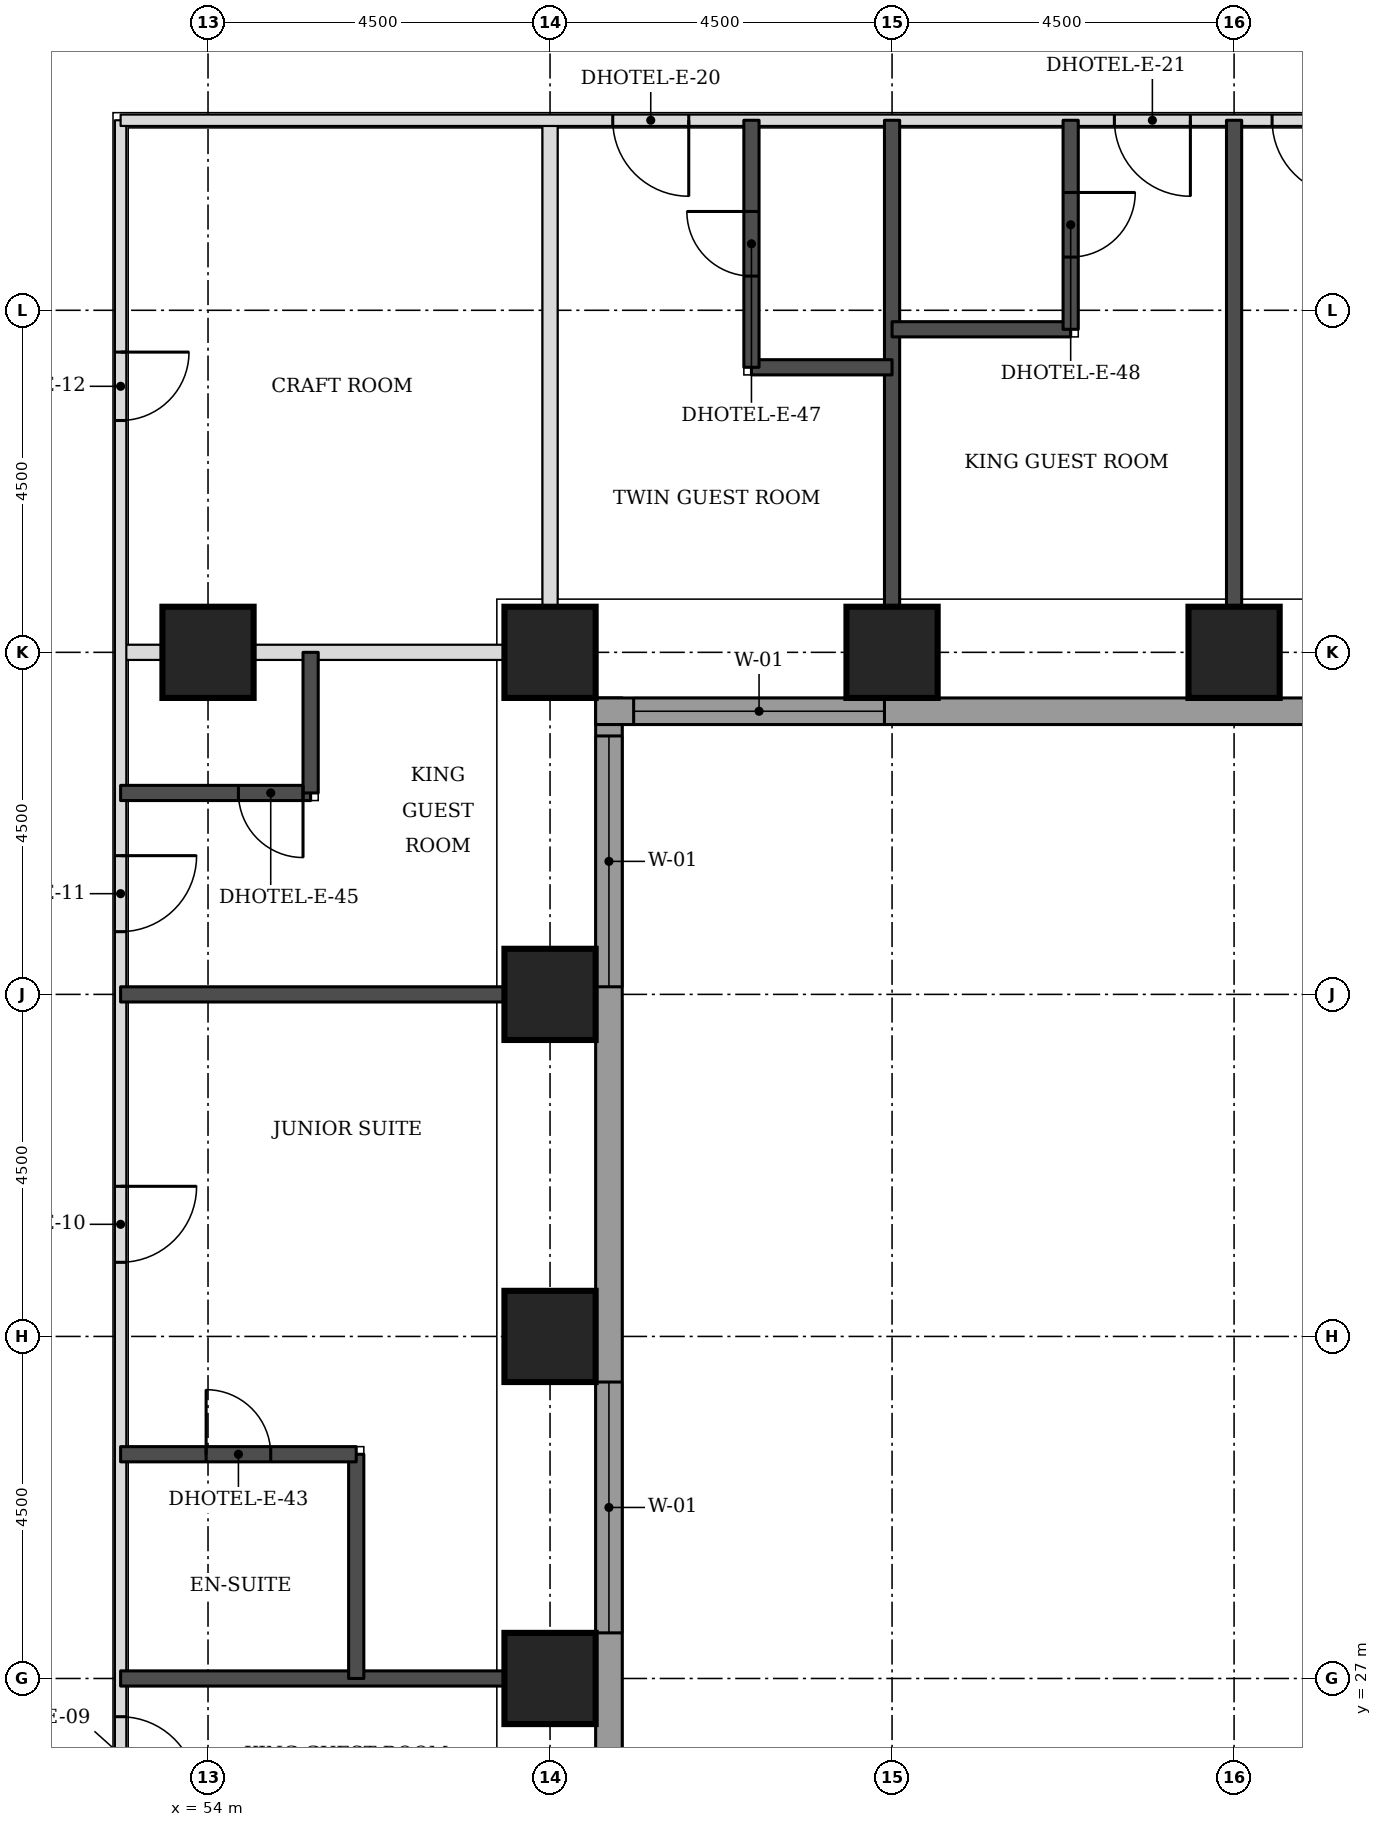
"""IFC4 building model, lengths in metres.
Left out: names, types, materials, properties, quantities, classifications, styles, units other than length and angle.
Written with IfcOpenShell. Run it as: python <this file> out.ifc"""

import sys

from ifc_helpers import new_model, si_unit, direction, frame, frame_2d, origin, origin_2d, place, context, subcontext, project, spatial, rectangle, extrude, element, fill, save


model = new_model("IFC4")
c1 = context("Model", 3, precision=1e-05, world=origin(), true_north=direction((0.0, 1.0)))
c2 = subcontext(c1, "Body", "Model", "MODEL_VIEW")
j1 = project(units=[si_unit("LENGTHUNIT", "METRE"), si_unit("PLANEANGLEUNIT", "RADIAN")], contexts=[c1])
p1 = place(None, origin())
s1 = spatial("IfcSite", under=j1, at=p1, CompositionType="ELEMENT")
p2 = place(p1, origin())
s2 = spatial("IfcBuilding", under=s1, at=p2, CompositionType="ELEMENT")
p3 = place(p2, frame((0.0, 0.0, 39.6)))
s3 = spatial("IfcBuildingStorey", under=s2, at=p3, CompositionType="ELEMENT", Elevation=39.6)
for number, where, z_axis, x_axis in (
    (1, (58.5, 27.0, 0.0), (0.0, 0.0, 1.0), (1.0, 0.0, 0.0)),
    (2, (58.5, 31.5, 0.0), (0.0, 0.0, 1.0), (1.0, 0.0, 0.0)),
    (3, (58.5, 36.0, 0.0), (0.0, 0.0, 1.0), (1.0, 0.0, 0.0)),
    (4, (54.0, 40.5, 0.0), (0.0, 0.0, 1.0), (1.0, 0.0, 0.0)),
    (5, (58.5, 40.5, 0.0), (0.0, 0.0, 1.0), (1.0, 0.0, 0.0)),
    (6, (63.0, 40.5, 0.0), (0.0, 0.0, 1.0), (1.0, 0.0, 0.0)),
    (7, (67.5, 40.5, 0.0), (0.0, 0.0, 1.0), (1.0, 0.0, 0.0)),
):
    element("IfcColumn", number, at=place(p3, frame(where, z_axis=z_axis, x_axis=x_axis)), inside=s3, PredefinedType="COLUMN", context=c2, shape_type="SweptSolid", body=[
        extrude(rectangle(XDim=1.2, YDim=1.2, at=origin_2d()), origin(), (0.0, 0.0, 1.0), 3.3),
    ])
p4 = place(p3, frame((59.275, 22.106, 0.0), z_axis=(0.0, 0.0, 1.0), x_axis=(0.0, 1.0, 0.0)))
e8 = element("IfcWall", 8, at=p4, inside=s3, PredefinedType="STANDARD", context=c2, shape_type="SweptSolid", body=[
    extrude(rectangle(XDim=17.793, YDim=0.35, at=frame_2d((8.897, 0.0))), origin(), (0.0, 0.0, 1.0), 3.055),
])
p5 = place(p4, frame((5.493, 0.0, 0.8)))
e9 = element("IfcOpeningElement", 9, at=p5, cuts=e8, PredefinedType="OPENING", context=c2, shape_type="SweptSolid", body=[
    extrude(rectangle(XDim=3.3, YDim=1.5, at=frame_2d((1.65, 0.75))), frame((0.0, 0.185, 0.0), z_axis=(0.0, -1.0, 0.0), x_axis=(1.0, 0.0, 0.0)), (0.0, 0.0, 1.0), 0.37),
])
p6 = place(p4, frame((13.993, 0.0, 0.8)))
e10 = element("IfcOpeningElement", 10, at=p6, cuts=e8, PredefinedType="OPENING", context=c2, shape_type="SweptSolid", body=[
    extrude(rectangle(XDim=3.3, YDim=1.5, at=frame_2d((1.65, 0.75))), frame((0.0, 0.185, 0.0), z_axis=(0.0, -1.0, 0.0), x_axis=(1.0, 0.0, 0.0)), (0.0, 0.0, 1.0), 0.37),
])
p7 = place(p3, frame((59.1, 39.725, 0.0), z_axis=(0.0, 0.0, 1.0), x_axis=(1.0, 0.0, 0.0)))
e11 = element("IfcWall", 11, at=p7, inside=s3, PredefinedType="STANDARD", context=c2, shape_type="SweptSolid", body=[
    extrude(rectangle(XDim=13.293, YDim=0.35, at=frame_2d((6.647, 0.0))), origin(), (0.0, 0.0, 1.0), 3.055),
])
p8 = place(p7, frame((0.5, 0.0, 0.8)))
e12 = element("IfcOpeningElement", 12, at=p8, cuts=e11, PredefinedType="OPENING", context=c2, shape_type="SweptSolid", body=[
    extrude(rectangle(XDim=3.3, YDim=1.5, at=frame_2d((1.65, 0.75))), frame((0.0, 0.185, 0.0), z_axis=(0.0, -1.0, 0.0), x_axis=(1.0, 0.0, 0.0)), (0.0, 0.0, 1.0), 0.37),
])
p9 = place(p3, frame((52.85, 40.5, 0.0), z_axis=(0.0, 0.0, 1.0), x_axis=(1.0, 0.0, 0.0)))
e13 = element("IfcWall", 13, at=p9, inside=s3, PredefinedType="PARTITIONING", context=c2, shape_type="SweptSolid", body=[
    extrude(rectangle(XDim=5.05, YDim=0.2, at=frame_2d((2.525, 0.0))), origin(), (0.0, 0.0, 1.0), 2.33),
])
p10 = place(p3, frame((58.5, 41.1, 0.0), z_axis=(0.0, 0.0, 1.0), x_axis=(0.0, 1.0, 0.0)))
e14 = element("IfcWall", 14, at=p10, inside=s3, PredefinedType="PARTITIONING", context=c2, shape_type="SweptSolid", body=[
    extrude(rectangle(XDim=6.4, YDim=0.2, at=frame_2d((3.2, 0.0))), origin(), (0.0, 0.0, 1.0), 3.08),
])
p11 = place(p3, frame((52.85, 25.15, 0.0), z_axis=(0.0, 0.0, 1.0), x_axis=(0.0, 1.0, 0.0)))
e15 = element("IfcWall", 15, at=p11, inside=s3, PredefinedType="PARTITIONING", context=c2, shape_type="SweptSolid", body=[
    extrude(rectangle(XDim=22.35, YDim=0.15, at=frame_2d((11.175, 0.0))), origin(), (0.0, 0.0, 1.0), 3.08),
])
p12 = place(p11, frame((0.347, 0.0, 0.0)))
e16 = element("IfcOpeningElement", 16, at=p12, cuts=e15, PredefinedType="OPENING", context=c2, shape_type="SweptSolid", body=[
    extrude(rectangle(XDim=1.0, YDim=2.1, at=frame_2d((0.5, 1.05))), frame((0.0, 0.085, 0.0), z_axis=(0.0, -1.0, 0.0), x_axis=(1.0, 0.0, 0.0)), (0.0, 0.0, 1.0), 0.17),
])
p13 = place(p11, frame((7.325, 0.0, 0.0)))
e17 = element("IfcOpeningElement", 17, at=p13, cuts=e15, PredefinedType="OPENING", context=c2, shape_type="SweptSolid", body=[
    extrude(rectangle(XDim=1.0, YDim=2.1, at=frame_2d((0.5, 1.05))), frame((0.0, 0.085, 0.0), z_axis=(0.0, -1.0, 0.0), x_axis=(1.0, 0.0, 0.0)), (0.0, 0.0, 1.0), 0.17),
])
p14 = place(p11, frame((11.675, 0.0, 0.0)))
e18 = element("IfcOpeningElement", 18, at=p14, cuts=e15, PredefinedType="OPENING", context=c2, shape_type="SweptSolid", body=[
    extrude(rectangle(XDim=1.0, YDim=2.1, at=frame_2d((0.5, 1.05))), frame((0.0, 0.085, 0.0), z_axis=(0.0, -1.0, 0.0), x_axis=(1.0, 0.0, 0.0)), (0.0, 0.0, 1.0), 0.17),
])
p15 = place(p11, frame((18.4, 0.0, 0.0)))
e19 = element("IfcOpeningElement", 19, at=p15, cuts=e15, PredefinedType="OPENING", context=c2, shape_type="SweptSolid", body=[
    extrude(rectangle(XDim=0.9, YDim=2.1, at=frame_2d((0.45, 1.05))), frame((0.0, 0.085, 0.0), z_axis=(0.0, -1.0, 0.0), x_axis=(1.0, 0.0, 0.0)), (0.0, 0.0, 1.0), 0.17),
])
p16 = place(p3, frame((52.85, 47.5, 0.0), z_axis=(0.0, 0.0, 1.0), x_axis=(1.0, 0.0, 0.0)))
e20 = element("IfcWall", 20, at=p16, inside=s3, PredefinedType="PARTITIONING", context=c2, shape_type="SweptSolid", body=[
    extrude(rectangle(XDim=16.65, YDim=0.15, at=frame_2d((8.325, 0.0))), origin(), (0.0, 0.0, 1.0), 3.08),
])
p17 = place(p16, frame((13.075, 0.0, 0.0)))
e21 = element("IfcOpeningElement", 21, at=p17, cuts=e20, PredefinedType="OPENING", context=c2, shape_type="SweptSolid", body=[
    extrude(rectangle(XDim=1.0, YDim=2.1, at=frame_2d((0.5, 1.05))), frame((0.0, 0.085, 0.0), z_axis=(0.0, -1.0, 0.0), x_axis=(1.0, 0.0, 0.0)), (0.0, 0.0, 1.0), 0.17),
])
p18 = place(p16, frame((6.475, 0.0, 0.0)))
e22 = element("IfcOpeningElement", 22, at=p18, cuts=e20, PredefinedType="OPENING", context=c2, shape_type="SweptSolid", body=[
    extrude(rectangle(XDim=1.0, YDim=2.1, at=frame_2d((0.5, 1.05))), frame((0.0, 0.085, 0.0), z_axis=(0.0, -1.0, 0.0), x_axis=(1.0, 0.0, 0.0)), (0.0, 0.0, 1.0), 0.17),
])
p19 = place(p16, frame((15.15, 0.0, 0.0)))
e23 = element("IfcOpeningElement", 23, at=p19, cuts=e20, PredefinedType="OPENING", context=c2, shape_type="SweptSolid", body=[
    extrude(rectangle(XDim=1.0, YDim=2.1, at=frame_2d((0.5, 1.05))), frame((0.0, 0.085, 0.0), z_axis=(0.0, -1.0, 0.0), x_axis=(1.0, 0.0, 0.0)), (0.0, 0.0, 1.0), 0.17),
])
p20 = place(p3, frame((52.85, 27.0, 0.0), z_axis=(0.0, 0.0, 1.0), x_axis=(1.0, 0.0, 0.0)))
e24 = element("IfcWall", 24, at=p20, inside=s3, PredefinedType="SOLIDWALL", context=c2, shape_type="SweptSolid", body=[
    extrude(rectangle(XDim=5.05, YDim=0.2, at=frame_2d((2.525, 0.0))), origin(), (0.0, 0.0, 1.0), 3.08),
])
p21 = place(p3, frame((55.95, 27.0, 0.0), z_axis=(0.0, 0.0, 1.0), x_axis=(0.0, 1.0, 0.0)))
e25 = element("IfcWall", 25, at=p21, inside=s3, PredefinedType="SOLIDWALL", context=c2, shape_type="SweptSolid", body=[
    extrude(rectangle(XDim=2.95, YDim=0.2, at=frame_2d((1.475, 0.0))), origin(), (0.0, 0.0, 1.0), 3.08),
])
p22 = place(p3, frame((52.85, 29.95, 0.0), z_axis=(0.0, 0.0, 1.0), x_axis=(1.0, 0.0, 0.0)))
e26 = element("IfcWall", 26, at=p22, inside=s3, PredefinedType="SOLIDWALL", context=c2, shape_type="SweptSolid", body=[
    extrude(rectangle(XDim=3.1, YDim=0.2, at=frame_2d((1.55, 0.0))), origin(), (0.0, 0.0, 1.0), 3.08),
])
p23 = place(p22, frame((1.125, 0.0, 0.0)))
e27 = element("IfcOpeningElement", 27, at=p23, cuts=e26, PredefinedType="OPENING", context=c2, shape_type="SweptSolid", body=[
    extrude(rectangle(XDim=0.85, YDim=2.1, at=frame_2d((0.425, 1.05))), frame((0.0, 0.11, 0.0), z_axis=(0.0, -1.0, 0.0), x_axis=(1.0, 0.0, 0.0)), (0.0, 0.0, 1.0), 0.22),
])
p24 = place(p3, frame((52.85, 36.0, 0.0), z_axis=(0.0, 0.0, 1.0), x_axis=(1.0, 0.0, 0.0)))
e28 = element("IfcWall", 28, at=p24, inside=s3, PredefinedType="SOLIDWALL", context=c2, shape_type="SweptSolid", body=[
    extrude(rectangle(XDim=5.05, YDim=0.2, at=frame_2d((2.525, 0.0))), origin(), (0.0, 0.0, 1.0), 3.08),
])
p25 = place(p3, frame((52.85, 38.65, 0.0), z_axis=(0.0, 0.0, 1.0), x_axis=(1.0, 0.0, 0.0)))
e29 = element("IfcWall", 29, at=p25, inside=s3, PredefinedType="SOLIDWALL", context=c2, shape_type="SweptSolid", body=[
    extrude(rectangle(XDim=2.5, YDim=0.2, at=frame_2d((1.25, 0.0))), origin(), (0.0, 0.0, 1.0), 3.08),
])
p26 = place(p25, frame((1.55, 0.0, 0.0)))
e30 = element("IfcOpeningElement", 30, at=p26, cuts=e29, PredefinedType="OPENING", context=c2, shape_type="SweptSolid", body=[
    extrude(rectangle(XDim=0.85, YDim=2.1, at=frame_2d((0.425, 1.05))), frame((0.0, 0.11, 0.0), z_axis=(0.0, -1.0, 0.0), x_axis=(1.0, 0.0, 0.0)), (0.0, 0.0, 1.0), 0.22),
])
p27 = place(p3, frame((55.35, 38.65, 0.0), z_axis=(0.0, 0.0, 1.0), x_axis=(0.0, 1.0, 0.0)))
e31 = element("IfcWall", 31, at=p27, inside=s3, PredefinedType="SOLIDWALL", context=c2, shape_type="SweptSolid", body=[
    extrude(rectangle(XDim=1.85, YDim=0.2, at=frame_2d((0.925, 0.0))), origin(), (0.0, 0.0, 1.0), 3.08),
])
for number, where, z_axis, x_axis in (
    (32, (63.0, 41.1, 0.0), (0.0, 0.0, 1.0), (0.0, 1.0, 0.0)),
    (33, (67.5, 41.1, 0.0), (0.0, 0.0, 1.0), (0.0, 1.0, 0.0)),
):
    element("IfcWall", number, at=place(p3, frame(where, z_axis=z_axis, x_axis=x_axis)), inside=s3, PredefinedType="SOLIDWALL", context=c2, shape_type="SweptSolid", body=[
        extrude(rectangle(XDim=6.4, YDim=0.2, at=frame_2d((3.2, 0.0))), origin(), (0.0, 0.0, 1.0), 3.08),
    ])
p28 = place(p3, frame((61.15, 44.25, 0.0), z_axis=(0.0, 0.0, 1.0), x_axis=(1.0, 0.0, 0.0)))
e34 = element("IfcWall", 34, at=p28, inside=s3, PredefinedType="SOLIDWALL", context=c2, shape_type="SweptSolid", body=[
    extrude(rectangle(XDim=1.85, YDim=0.2, at=frame_2d((0.925, 0.0))), origin(), (0.0, 0.0, 1.0), 3.08),
])
p29 = place(p3, frame((61.15, 44.25, 0.0), z_axis=(0.0, 0.0, 1.0), x_axis=(0.0, 1.0, 0.0)))
e35 = element("IfcWall", 35, at=p29, inside=s3, PredefinedType="SOLIDWALL", context=c2, shape_type="SweptSolid", body=[
    extrude(rectangle(XDim=3.25, YDim=0.2, at=frame_2d((1.625, 0.0))), origin(), (0.0, 0.0, 1.0), 3.08),
])
p30 = place(p29, frame((1.2, 0.0, 0.0)))
e36 = element("IfcOpeningElement", 36, at=p30, cuts=e35, PredefinedType="OPENING", context=c2, shape_type="SweptSolid", body=[
    extrude(rectangle(XDim=0.85, YDim=2.1, at=frame_2d((0.425, 1.05))), frame((0.0, 0.11, 0.0), z_axis=(0.0, -1.0, 0.0), x_axis=(1.0, 0.0, 0.0)), (0.0, 0.0, 1.0), 0.22),
])
p31 = place(p3, frame((63.0, 44.75, 0.0), z_axis=(0.0, 0.0, 1.0), x_axis=(1.0, 0.0, 0.0)))
e37 = element("IfcWall", 37, at=p31, inside=s3, PredefinedType="SOLIDWALL", context=c2, shape_type="SweptSolid", body=[
    extrude(rectangle(XDim=2.35, YDim=0.2, at=frame_2d((1.175, 0.0))), origin(), (0.0, 0.0, 1.0), 3.08),
])
p32 = place(p3, frame((65.35, 44.75, 0.0), z_axis=(0.0, 0.0, 1.0), x_axis=(0.0, 1.0, 0.0)))
e38 = element("IfcWall", 38, at=p32, inside=s3, PredefinedType="SOLIDWALL", context=c2, shape_type="SweptSolid", body=[
    extrude(rectangle(XDim=2.75, YDim=0.2, at=frame_2d((1.375, 0.0))), origin(), (0.0, 0.0, 1.0), 3.08),
])
p33 = place(p32, frame((0.95, 0.0, 0.0)))
e39 = element("IfcOpeningElement", 39, at=p33, cuts=e38, PredefinedType="OPENING", context=c2, shape_type="SweptSolid", body=[
    extrude(rectangle(XDim=0.85, YDim=2.1, at=frame_2d((0.425, 1.05))), frame((0.0, 0.11, 0.0), z_axis=(0.0, -1.0, 0.0), x_axis=(1.0, 0.0, 0.0)), (0.0, 0.0, 1.0), 0.22),
])
p34 = place(p5, origin())
e40 = element("IfcWindow", 40, at=p34, inside=s3, PartitioningType="SINGLE_PANEL", PredefinedType="WINDOW", context=c2, shape_type="SweptSolid", body=[
    extrude(rectangle(XDim=3.3, YDim=1.5, at=frame_2d((1.65, 0.75))), frame((0.0, 0.085, 0.0), z_axis=(0.0, -1.0, 0.0), x_axis=(1.0, 0.0, 0.0)), (0.0, 0.0, 1.0), 0.06),
])
fill(e9, e40)
p35 = place(p6, origin())
e41 = element("IfcWindow", 41, at=p35, inside=s3, PartitioningType="SINGLE_PANEL", PredefinedType="WINDOW", context=c2, shape_type="SweptSolid", body=[
    extrude(rectangle(XDim=3.3, YDim=1.5, at=frame_2d((1.65, 0.75))), frame((0.0, 0.085, 0.0), z_axis=(0.0, -1.0, 0.0), x_axis=(1.0, 0.0, 0.0)), (0.0, 0.0, 1.0), 0.06),
])
fill(e10, e41)
p36 = place(p8, origin())
e42 = element("IfcWindow", 42, at=p36, inside=s3, PartitioningType="SINGLE_PANEL", PredefinedType="WINDOW", context=c2, shape_type="SweptSolid", body=[
    extrude(rectangle(XDim=3.3, YDim=1.5, at=frame_2d((1.65, 0.75))), frame((0.0, 0.085, 0.0), z_axis=(0.0, -1.0, 0.0), x_axis=(1.0, 0.0, 0.0)), (0.0, 0.0, 1.0), 0.06),
])
fill(e12, e42)
p37 = place(p12, frame((1.0, 0.0, 0.0), z_axis=(0.0, 0.0, 1.0), x_axis=(-1.0, 0.0, 0.0)))
e43 = element("IfcDoor", 43, at=p37, inside=s3, OperationType="SINGLE_SWING_RIGHT", PredefinedType="DOOR", context=c2, shape_type="SweptSolid", body=[
    extrude(rectangle(XDim=1.0, YDim=2.1, at=frame_2d((0.5, 1.05))), frame((0.0, 0.025, 0.0), z_axis=(0.0, -1.0, 0.0), x_axis=(1.0, 0.0, 0.0)), (0.0, 0.0, 1.0), 0.05),
])
fill(e16, e43)
p38 = place(p13, frame((1.0, 0.0, 0.0), z_axis=(0.0, 0.0, 1.0), x_axis=(-1.0, 0.0, 0.0)))
e44 = element("IfcDoor", 44, at=p38, inside=s3, OperationType="SINGLE_SWING_LEFT", PredefinedType="DOOR", context=c2, shape_type="SweptSolid", body=[
    extrude(rectangle(XDim=1.0, YDim=2.1, at=frame_2d((0.5, 1.05))), frame((0.0, 0.025, 0.0), z_axis=(0.0, -1.0, 0.0), x_axis=(1.0, 0.0, 0.0)), (0.0, 0.0, 1.0), 0.05),
])
fill(e17, e44)
p39 = place(p23, origin())
e45 = element("IfcDoor", 45, at=p39, inside=s3, OperationType="SINGLE_SWING_LEFT", PredefinedType="DOOR", context=c2, shape_type="SweptSolid", body=[
    extrude(rectangle(XDim=0.85, YDim=2.1, at=frame_2d((0.425, 1.05))), frame((0.0, 0.025, 0.0), z_axis=(0.0, -1.0, 0.0), x_axis=(1.0, 0.0, 0.0)), (0.0, 0.0, 1.0), 0.05),
])
fill(e27, e45)
p40 = place(p14, frame((1.0, 0.0, 0.0), z_axis=(0.0, 0.0, 1.0), x_axis=(-1.0, 0.0, 0.0)))
e46 = element("IfcDoor", 46, at=p40, inside=s3, OperationType="SINGLE_SWING_LEFT", PredefinedType="DOOR", context=c2, shape_type="SweptSolid", body=[
    extrude(rectangle(XDim=1.0, YDim=2.1, at=frame_2d((0.5, 1.05))), frame((0.0, 0.025, 0.0), z_axis=(0.0, -1.0, 0.0), x_axis=(1.0, 0.0, 0.0)), (0.0, 0.0, 1.0), 0.05),
])
fill(e18, e46)
p41 = place(p26, frame((0.85, 0.0, 0.0), z_axis=(0.0, 0.0, 1.0), x_axis=(-1.0, 0.0, 0.0)))
e47 = element("IfcDoor", 47, at=p41, inside=s3, OperationType="SINGLE_SWING_LEFT", PredefinedType="DOOR", context=c2, shape_type="SweptSolid", body=[
    extrude(rectangle(XDim=0.85, YDim=2.1, at=frame_2d((0.425, 1.05))), frame((0.0, 0.025, 0.0), z_axis=(0.0, -1.0, 0.0), x_axis=(1.0, 0.0, 0.0)), (0.0, 0.0, 1.0), 0.05),
])
fill(e30, e47)
p42 = place(p17, frame((1.0, 0.0, 0.0), z_axis=(0.0, 0.0, 1.0), x_axis=(-1.0, 0.0, 0.0)))
e48 = element("IfcDoor", 48, at=p42, inside=s3, OperationType="SINGLE_SWING_LEFT", PredefinedType="DOOR", context=c2, shape_type="SweptSolid", body=[
    extrude(rectangle(XDim=1.0, YDim=2.1, at=frame_2d((0.5, 1.05))), frame((0.0, 0.025, 0.0), z_axis=(0.0, -1.0, 0.0), x_axis=(1.0, 0.0, 0.0)), (0.0, 0.0, 1.0), 0.05),
])
fill(e21, e48)
p43 = place(p33, frame((0.85, 0.0, 0.0), z_axis=(0.0, 0.0, 1.0), x_axis=(-1.0, 0.0, 0.0)))
e49 = element("IfcDoor", 49, at=p43, inside=s3, OperationType="SINGLE_SWING_LEFT", PredefinedType="DOOR", context=c2, shape_type="SweptSolid", body=[
    extrude(rectangle(XDim=0.85, YDim=2.1, at=frame_2d((0.425, 1.05))), frame((0.0, 0.025, 0.0), z_axis=(0.0, -1.0, 0.0), x_axis=(1.0, 0.0, 0.0)), (0.0, 0.0, 1.0), 0.05),
])
fill(e39, e49)
p44 = place(p18, frame((1.0, 0.0, 0.0), z_axis=(0.0, 0.0, 1.0), x_axis=(-1.0, 0.0, 0.0)))
e50 = element("IfcDoor", 50, at=p44, inside=s3, OperationType="SINGLE_SWING_LEFT", PredefinedType="DOOR", context=c2, shape_type="SweptSolid", body=[
    extrude(rectangle(XDim=1.0, YDim=2.1, at=frame_2d((0.5, 1.05))), frame((0.0, 0.025, 0.0), z_axis=(0.0, -1.0, 0.0), x_axis=(1.0, 0.0, 0.0)), (0.0, 0.0, 1.0), 0.05),
])
fill(e22, e50)
p45 = place(p30, origin())
e51 = element("IfcDoor", 51, at=p45, inside=s3, OperationType="SINGLE_SWING_RIGHT", PredefinedType="DOOR", context=c2, shape_type="SweptSolid", body=[
    extrude(rectangle(XDim=0.85, YDim=2.1, at=frame_2d((0.425, 1.05))), frame((0.0, 0.025, 0.0), z_axis=(0.0, -1.0, 0.0), x_axis=(1.0, 0.0, 0.0)), (0.0, 0.0, 1.0), 0.05),
])
fill(e36, e51)
p46 = place(p19, frame((1.0, 0.0, 0.0), z_axis=(0.0, 0.0, 1.0), x_axis=(-1.0, 0.0, 0.0)))
e52 = element("IfcDoor", 52, at=p46, inside=s3, OperationType="SINGLE_SWING_LEFT", PredefinedType="DOOR", context=c2, shape_type="SweptSolid", body=[
    extrude(rectangle(XDim=1.0, YDim=2.1, at=frame_2d((0.5, 1.05))), frame((0.0, 0.025, 0.0), z_axis=(0.0, -1.0, 0.0), x_axis=(1.0, 0.0, 0.0)), (0.0, 0.0, 1.0), 0.05),
])
fill(e23, e52)
p47 = place(p15, frame((0.9, 0.0, 0.0), z_axis=(0.0, 0.0, 1.0), x_axis=(-1.0, 0.0, 0.0)))
e53 = element("IfcDoor", 53, at=p47, inside=s3, OperationType="SINGLE_SWING_LEFT", PredefinedType="DOOR", context=c2, shape_type="SweptSolid", body=[
    extrude(rectangle(XDim=0.9, YDim=2.1, at=frame_2d((0.45, 1.05))), frame((0.0, 0.025, 0.0), z_axis=(0.0, -1.0, 0.0), x_axis=(1.0, 0.0, 0.0)), (0.0, 0.0, 1.0), 0.05),
])
fill(e19, e53)
save(model, sys.argv[1])
